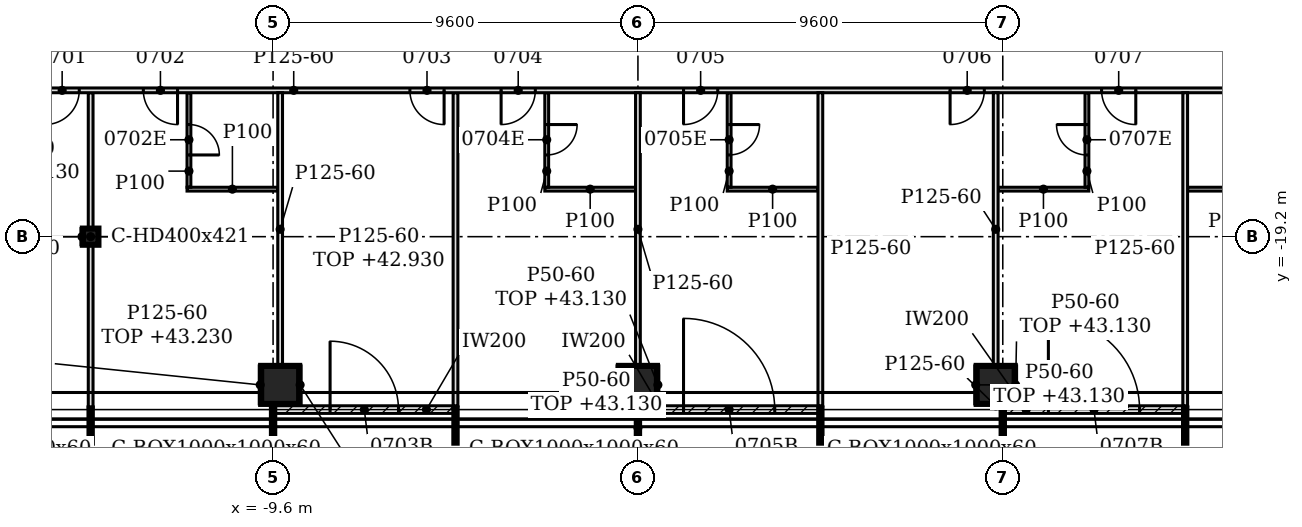
"""IFC4 building model, lengths in metres.
Left out: names, types, materials, properties, quantities, classifications, styles, units other than length and angle.
Written with IfcOpenShell. Run it as: python <this file> out.ifc"""

import sys

from ifc_helpers import new_model, si_unit, direction, frame, frame_2d, origin, origin_2d, place, context, subcontext, project, spatial, polyline, rectangle, hollow_rectangle, i_section, outline, extrude, element, fill, save


model = new_model("IFC4")
c1 = context("Model", 3, precision=1e-05, world=origin(), true_north=direction((0.0, 1.0)))
c2 = subcontext(c1, "Body", "Model", "MODEL_VIEW")
j1 = project(units=[si_unit("LENGTHUNIT", "METRE"), si_unit("PLANEANGLEUNIT", "RADIAN")], contexts=[c1])
p1 = place(None, origin())
s1 = spatial("IfcSite", under=j1, at=p1, CompositionType="ELEMENT")
p2 = place(p1, origin())
s2 = spatial("IfcBuilding", under=s1, at=p2, CompositionType="ELEMENT")
p3 = place(p2, frame((0.0, 0.0, 40.2)))
s3 = spatial("IfcBuildingStorey", under=s2, at=p3, CompositionType="ELEMENT", Elevation=40.2)
for number, where, z_axis, x_axis in (
    (1, (-9.414, -23.1, -0.15), (0.0, 0.0, 1.0), (1.0, 0.0, 0.0)),
    (2, (0.0, -23.1, -0.15), (0.0, 0.0, 1.0), (1.0, 0.0, 0.0)),
    (3, (9.414, -23.1, -0.15), (0.0, 0.0, 1.0), (1.0, 0.0, 0.0)),
):
    element("IfcColumn", number, at=place(p3, frame(where, z_axis=z_axis, x_axis=x_axis)), inside=s3, PredefinedType="COLUMN", context=c2, shape_type="SweptSolid", body=[
        extrude(hollow_rectangle(XDim=1.0, YDim=1.0, WallThickness=0.06, at=origin_2d()), origin(), (0.0, 0.0, 1.0), 3.6),
    ])
p4 = place(p3, frame((-14.4, -19.2, -0.15), z_axis=(0.0, 0.0, 1.0), x_axis=(1.0, 0.0, 0.0)))
e4 = element("IfcColumn", 4, at=p4, inside=s3, PredefinedType="COLUMN", context=c2, shape_type="SweptSolid", body=[
    extrude(i_section(OverallWidth=0.409, OverallDepth=0.425, WebThickness=0.033, FlangeThickness=0.052, FilletRadius=0.015, at=origin_2d()), origin(), (0.0, 0.0, 1.0), 3.6),
])
p5 = place(p3, frame((-9.57, -23.75, 0.0), z_axis=(0.0, 0.0, 1.0), x_axis=(1.0, 0.0, 0.0)))
e5 = element("IfcWall", 5, at=p5, inside=s3, PredefinedType="NOTDEFINED", context=c2, shape_type="SweptSolid", body=[
    extrude(rectangle(XDim=4.74, YDim=0.2, at=frame_2d((2.37, 0.0))), origin(), (0.0, 0.0, 1.0), 3.45),
])
p6 = place(p5, frame((1.47, 0.0, 0.0)))
e6 = element("IfcOpeningElement", 6, at=p6, cuts=e5, PredefinedType="OPENING", context=c2, shape_type="SweptSolid", body=[
    extrude(rectangle(XDim=1.8, YDim=2.4, at=frame_2d((0.9, 1.2))), frame((0.0, 0.11, 0.0), z_axis=(0.0, -1.0, 0.0), x_axis=(1.0, 0.0, 0.0)), (0.0, 0.0, 1.0), 0.22),
])
p7 = place(p3, frame((0.03, -23.75, 0.0), z_axis=(0.0, 0.0, 1.0), x_axis=(1.0, 0.0, 0.0)))
e7 = element("IfcWall", 7, at=p7, inside=s3, PredefinedType="NOTDEFINED", context=c2, shape_type="SweptSolid", body=[
    extrude(rectangle(XDim=4.74, YDim=0.2, at=frame_2d((2.37, 0.0))), origin(), (0.0, 0.0, 1.0), 3.45),
])
p8 = place(p7, frame((1.17, 0.0, 0.0)))
e8 = element("IfcOpeningElement", 8, at=p8, cuts=e7, PredefinedType="OPENING", context=c2, shape_type="SweptSolid", body=[
    extrude(rectangle(XDim=2.4, YDim=2.4, at=frame_2d((1.2, 1.2))), frame((0.0, 0.11, 0.0), z_axis=(0.0, -1.0, 0.0), x_axis=(1.0, 0.0, 0.0)), (0.0, 0.0, 1.0), 0.22),
])
p9 = place(p3, frame((9.63, -23.75, 0.0), z_axis=(0.0, 0.0, 1.0), x_axis=(1.0, 0.0, 0.0)))
e9 = element("IfcWall", 9, at=p9, inside=s3, PredefinedType="NOTDEFINED", context=c2, shape_type="SweptSolid", body=[
    extrude(rectangle(XDim=4.74, YDim=0.2, at=frame_2d((2.37, 0.0))), origin(), (0.0, 0.0, 1.0), 3.45),
])
p10 = place(p9, frame((1.17, 0.0, 0.0)))
e10 = element("IfcOpeningElement", 10, at=p10, cuts=e9, PredefinedType="OPENING", context=c2, shape_type="SweptSolid", body=[
    extrude(rectangle(XDim=2.4, YDim=2.4, at=frame_2d((1.2, 1.2))), frame((0.0, 0.11, 0.0), z_axis=(0.0, -1.0, 0.0), x_axis=(1.0, 0.0, 0.0)), (0.0, 0.0, 1.0), 0.22),
])
p11 = place(p3, frame((-14.4, -23.69, 0.0), z_axis=(0.0, 0.0, 1.0), x_axis=(0.0, 1.0, 0.0)))
e11 = element("IfcWall", 11, at=p11, inside=s3, PredefinedType="PARTITIONING", context=c2, shape_type="SweptSolid", body=[
    extrude(outline(polyline([(0.0, 0.0), (4.277, 0.0), (4.278, 3.03), (0.74, 3.03), (0.738, 2.93), (0.44, 2.93), (0.438, 3.03), (0.0, 3.03), (0.0, 0.0)])), frame((0.0, 0.062, 0.0), z_axis=(0.0, -1.0, 0.0), x_axis=(1.0, 0.0, 0.0)), (0.0, 0.0, 1.0), 0.125),
])
p12 = place(p3, frame((-4.8, -23.65, 0.0), z_axis=(0.0, 0.0, 1.0), x_axis=(0.0, 1.0, 0.0)))
e12 = element("IfcWall", 12, at=p12, inside=s3, PredefinedType="PARTITIONING", context=c2, shape_type="SweptSolid", body=[
    extrude(rectangle(XDim=8.237, YDim=0.125, at=frame_2d((4.119, 0.0))), origin(), (0.0, 0.0, 1.0), 2.73),
])
p13 = place(p3, frame((4.8, -23.65, 0.0), z_axis=(0.0, 0.0, 1.0), x_axis=(0.0, 1.0, 0.0)))
e13 = element("IfcWall", 13, at=p13, inside=s3, PredefinedType="PARTITIONING", context=c2, shape_type="SweptSolid", body=[
    extrude(outline(polyline([(0.0, 0.0), (8.237, 0.0), (8.238, 3.45), (4.555, 3.45), (4.553, 2.88), (4.345, 2.88), (4.343, 3.45), (0.7, 3.45), (0.698, 2.93), (0.4, 2.93), (0.398, 3.45), (0.0, 3.45), (0.0, 0.0)])), frame((0.0, 0.062, 0.0), z_axis=(0.0, -1.0, 0.0), x_axis=(1.0, 0.0, 0.0)), (0.0, 0.0, 1.0), 0.125),
])
p14 = place(p3, frame((9.414, -23.703, 0.0), z_axis=(0.0, 0.0, 1.0), x_axis=(0.0, 1.0, 0.0)))
e14 = element("IfcWall", 14, at=p14, inside=s3, PredefinedType="PARTITIONING", context=c2, shape_type="SweptSolid", body=[
    extrude(rectangle(XDim=0.103, YDim=0.125, at=frame_2d((0.051, 0.0))), origin(), (0.0, 0.0, 1.0), 3.45),
])
p15 = place(p3, frame((14.4, -23.65, 0.0), z_axis=(0.0, 0.0, 1.0), x_axis=(0.0, 1.0, 0.0)))
e15 = element("IfcWall", 15, at=p15, inside=s3, PredefinedType="PARTITIONING", context=c2, shape_type="SweptSolid", body=[
    extrude(outline(polyline([(0.0, 0.0), (8.237, 0.0), (8.238, 3.45), (4.555, 3.45), (4.553, 2.88), (4.345, 2.88), (4.343, 3.45), (0.7, 3.45), (0.698, 2.93), (0.4, 2.93), (0.398, 3.45), (0.0, 3.45), (0.0, 0.0)])), frame((0.0, 0.062, 0.0), z_axis=(0.0, -1.0, 0.0), x_axis=(1.0, 0.0, 0.0)), (0.0, 0.0, 1.0), 0.125),
])
p16 = place(p3, frame((-9.414, -22.6, 0.0), z_axis=(0.0, 0.0, 1.0), x_axis=(0.0, 1.0, 0.0)))
e16 = element("IfcWall", 16, at=p16, inside=s3, PredefinedType="PARTITIONING", context=c2, shape_type="SweptSolid", body=[
    extrude(outline(polyline([(0.0, 0.0), (7.188, 0.0), (7.188, 3.45), (3.5, 3.45), (3.498, 2.93), (3.3, 2.93), (3.298, 3.45), (0.0, 3.45), (0.0, 0.0)])), frame((0.0, 0.062, 0.0), z_axis=(0.0, -1.0, 0.0), x_axis=(1.0, 0.0, 0.0)), (0.0, 0.0, 1.0), 0.125),
])
for number, where, z_axis, x_axis in (
    (17, (0.0, -22.6, 0.0), (0.0, 0.0, 1.0), (0.0, 1.0, 0.0)),
    (18, (9.414, -22.6, 0.0), (0.0, 0.0, 1.0), (0.0, 1.0, 0.0)),
):
    element("IfcWall", number, at=place(p3, frame(where, z_axis=z_axis, x_axis=x_axis)), inside=s3, PredefinedType="PARTITIONING", context=c2, shape_type="SweptSolid", body=[
        extrude(outline(polyline([(0.0, 0.0), (7.188, 0.0), (7.188, 3.45), (3.505, 3.45), (3.503, 2.88), (3.295, 2.88), (3.293, 3.45), (0.0, 3.45), (0.0, 0.0)])), frame((0.0, 0.062, 0.0), z_axis=(0.0, -1.0, 0.0), x_axis=(1.0, 0.0, 0.0)), (0.0, 0.0, 1.0), 0.125),
    ])
p17 = place(p3, frame((-14.4, -18.988, 0.0), z_axis=(0.0, 0.0, 1.0), x_axis=(0.0, 1.0, 0.0)))
e19 = element("IfcWall", 19, at=p17, inside=s3, PredefinedType="PARTITIONING", context=c2, shape_type="SweptSolid", body=[
    extrude(rectangle(XDim=3.575, YDim=0.125, at=frame_2d((1.788, 0.0))), origin(), (0.0, 0.0, 1.0), 2.93),
])
p18 = place(p3, frame((-11.864, -17.95, 0.0), z_axis=(0.0, 0.0, 1.0), x_axis=(1.0, 0.0, 0.0)))
e20 = element("IfcWall", 20, at=p18, inside=s3, PredefinedType="PARTITIONING", context=c2, shape_type="SweptSolid", body=[
    extrude(rectangle(XDim=2.387, YDim=0.1, at=frame_2d((1.194, 0.0))), origin(), (0.0, 0.0, 1.0), 3.45),
])
p19 = place(p3, frame((-11.814, -17.9, 0.0), z_axis=(0.0, 0.0, 1.0), x_axis=(0.0, 1.0, 0.0)))
e21 = element("IfcWall", 21, at=p19, inside=s3, PredefinedType="PARTITIONING", context=c2, shape_type="SweptSolid", body=[
    extrude(rectangle(XDim=2.487, YDim=0.1, at=frame_2d((1.244, 0.0))), origin(), (0.0, 0.0, 1.0), 3.45),
])
p20 = place(p19, frame((0.85, 0.0, 0.0)))
e22 = element("IfcOpeningElement", 22, at=p20, cuts=e21, PredefinedType="OPENING", context=c2, shape_type="SweptSolid", body=[
    extrude(rectangle(XDim=0.8, YDim=2.1, at=frame_2d((0.4, 1.05))), frame((0.0, 0.06, 0.0), z_axis=(0.0, -1.0, 0.0), x_axis=(1.0, 0.0, 0.0)), (0.0, 0.0, 1.0), 0.12),
])
p21 = place(p3, frame((-2.45, -17.95, 0.0), z_axis=(0.0, 0.0, 1.0), x_axis=(1.0, 0.0, 0.0)))
e23 = element("IfcWall", 23, at=p21, inside=s3, PredefinedType="PARTITIONING", context=c2, shape_type="SweptSolid", body=[
    extrude(rectangle(XDim=2.387, YDim=0.1, at=frame_2d((1.194, 0.0))), origin(), (0.0, 0.0, 1.0), 3.45),
])
p22 = place(p3, frame((-2.4, -17.9, 0.0), z_axis=(0.0, 0.0, 1.0), x_axis=(0.0, 1.0, 0.0)))
e24 = element("IfcWall", 24, at=p22, inside=s3, PredefinedType="PARTITIONING", context=c2, shape_type="SweptSolid", body=[
    extrude(rectangle(XDim=2.487, YDim=0.1, at=frame_2d((1.244, 0.0))), origin(), (0.0, 0.0, 1.0), 3.45),
])
p23 = place(p22, frame((0.85, 0.0, 0.0)))
e25 = element("IfcOpeningElement", 25, at=p23, cuts=e24, PredefinedType="OPENING", context=c2, shape_type="SweptSolid", body=[
    extrude(rectangle(XDim=0.8, YDim=2.1, at=frame_2d((0.4, 1.05))), frame((0.0, 0.06, 0.0), z_axis=(0.0, -1.0, 0.0), x_axis=(1.0, 0.0, 0.0)), (0.0, 0.0, 1.0), 0.12),
])
p24 = place(p3, frame((2.35, -17.95, 0.0), z_axis=(0.0, 0.0, 1.0), x_axis=(1.0, 0.0, 0.0)))
e26 = element("IfcWall", 26, at=p24, inside=s3, PredefinedType="PARTITIONING", context=c2, shape_type="SweptSolid", body=[
    extrude(rectangle(XDim=2.387, YDim=0.1, at=frame_2d((1.194, 0.0))), origin(), (0.0, 0.0, 1.0), 3.45),
])
p25 = place(p3, frame((2.4, -17.9, 0.0), z_axis=(0.0, 0.0, 1.0), x_axis=(0.0, 1.0, 0.0)))
e27 = element("IfcWall", 27, at=p25, inside=s3, PredefinedType="PARTITIONING", context=c2, shape_type="SweptSolid", body=[
    extrude(rectangle(XDim=2.487, YDim=0.1, at=frame_2d((1.244, 0.0))), origin(), (0.0, 0.0, 1.0), 3.45),
])
p26 = place(p25, frame((0.85, 0.0, 0.0)))
e28 = element("IfcOpeningElement", 28, at=p26, cuts=e27, PredefinedType="OPENING", context=c2, shape_type="SweptSolid", body=[
    extrude(rectangle(XDim=0.8, YDim=2.1, at=frame_2d((0.4, 1.05))), frame((0.0, 0.06, 0.0), z_axis=(0.0, -1.0, 0.0), x_axis=(1.0, 0.0, 0.0)), (0.0, 0.0, 1.0), 0.12),
])
p27 = place(p3, frame((9.477, -17.95, 0.0), z_axis=(0.0, 0.0, 1.0), x_axis=(1.0, 0.0, 0.0)))
e29 = element("IfcWall", 29, at=p27, inside=s3, PredefinedType="PARTITIONING", context=c2, shape_type="SweptSolid", body=[
    extrude(rectangle(XDim=2.387, YDim=0.1, at=frame_2d((1.194, 0.0))), origin(), (0.0, 0.0, 1.0), 3.45),
])
p28 = place(p3, frame((11.814, -17.9, 0.0), z_axis=(0.0, 0.0, 1.0), x_axis=(0.0, 1.0, 0.0)))
e30 = element("IfcWall", 30, at=p28, inside=s3, PredefinedType="PARTITIONING", context=c2, shape_type="SweptSolid", body=[
    extrude(rectangle(XDim=2.487, YDim=0.1, at=frame_2d((1.244, 0.0))), origin(), (0.0, 0.0, 1.0), 3.45),
])
p29 = place(p28, frame((0.85, 0.0, 0.0)))
e31 = element("IfcOpeningElement", 31, at=p29, cuts=e30, PredefinedType="OPENING", context=c2, shape_type="SweptSolid", body=[
    extrude(rectangle(XDim=0.8, YDim=2.1, at=frame_2d((0.4, 1.05))), frame((0.0, 0.06, 0.0), z_axis=(0.0, -1.0, 0.0), x_axis=(1.0, 0.0, 0.0)), (0.0, 0.0, 1.0), 0.12),
])
p30 = place(p3, frame((14.462, -17.95, 0.0), z_axis=(0.0, 0.0, 1.0), x_axis=(1.0, 0.0, 0.0)))
e32 = element("IfcWall", 32, at=p30, inside=s3, PredefinedType="PARTITIONING", context=c2, shape_type="SweptSolid", body=[
    extrude(rectangle(XDim=2.388, YDim=0.1, at=frame_2d((1.194, 0.0))), origin(), (0.0, 0.0, 1.0), 3.45),
])
p31 = place(p3, frame((-20.15, -15.35, 0.0), z_axis=(0.0, 0.0, 1.0), x_axis=(1.0, 0.0, 0.0)))
e33 = element("IfcWall", 33, at=p31, inside=s3, PredefinedType="PARTITIONING", context=c2, shape_type="SweptSolid", body=[
    extrude(outline(polyline([(0.0, 0.0), (39.287, 0.0), (39.288, 2.73), (39.2, 2.73), (39.198, 3.45), (27.5, 3.45), (27.498, 2.73), (27.2, 2.73), (27.198, 3.45), (15.5, 3.45), (15.498, 2.73), (15.2, 2.73), (15.198, 3.45), (5.9, 3.45), (5.898, 2.93), (5.6, 2.93), (5.598, 3.45), (0.0, 3.45), (0.0, 0.0)])), frame((0.0, 0.062, 0.0), z_axis=(0.0, -1.0, 0.0), x_axis=(1.0, 0.0, 0.0)), (0.0, 0.0, 1.0), 0.125),
])
p32 = place(p31, frame((4.55, 0.0, 0.0)))
e34 = element("IfcOpeningElement", 34, at=p32, cuts=e33, PredefinedType="OPENING", context=c2, shape_type="SweptSolid", body=[
    extrude(rectangle(XDim=0.9, YDim=2.1, at=frame_2d((0.45, 1.05))), frame((0.0, 0.073, 0.0), z_axis=(0.0, -1.0, 0.0), x_axis=(1.0, 0.0, 0.0)), (0.0, 0.0, 1.0), 0.145),
])
p33 = place(p31, frame((7.136, 0.0, 0.0)))
e35 = element("IfcOpeningElement", 35, at=p33, cuts=e33, PredefinedType="OPENING", context=c2, shape_type="SweptSolid", body=[
    extrude(rectangle(XDim=0.9, YDim=2.1, at=frame_2d((0.45, 1.05))), frame((0.0, 0.073, 0.0), z_axis=(0.0, -1.0, 0.0), x_axis=(1.0, 0.0, 0.0)), (0.0, 0.0, 1.0), 0.145),
])
p34 = place(p31, frame((14.15, 0.0, 0.0)))
e36 = element("IfcOpeningElement", 36, at=p34, cuts=e33, PredefinedType="OPENING", context=c2, shape_type="SweptSolid", body=[
    extrude(rectangle(XDim=0.9, YDim=2.1, at=frame_2d((0.45, 1.05))), frame((0.0, 0.073, 0.0), z_axis=(0.0, -1.0, 0.0), x_axis=(1.0, 0.0, 0.0)), (0.0, 0.0, 1.0), 0.145),
])
p35 = place(p31, frame((16.55, 0.0, 0.0)))
e37 = element("IfcOpeningElement", 37, at=p35, cuts=e33, PredefinedType="OPENING", context=c2, shape_type="SweptSolid", body=[
    extrude(rectangle(XDim=0.9, YDim=2.1, at=frame_2d((0.45, 1.05))), frame((0.0, 0.073, 0.0), z_axis=(0.0, -1.0, 0.0), x_axis=(1.0, 0.0, 0.0)), (0.0, 0.0, 1.0), 0.145),
])
p36 = place(p31, frame((21.35, 0.0, 0.0)))
e38 = element("IfcOpeningElement", 38, at=p36, cuts=e33, PredefinedType="OPENING", context=c2, shape_type="SweptSolid", body=[
    extrude(rectangle(XDim=0.9, YDim=2.1, at=frame_2d((0.45, 1.05))), frame((0.0, 0.073, 0.0), z_axis=(0.0, -1.0, 0.0), x_axis=(1.0, 0.0, 0.0)), (0.0, 0.0, 1.0), 0.145),
])
p37 = place(p31, frame((28.364, 0.0, 0.0)))
e39 = element("IfcOpeningElement", 39, at=p37, cuts=e33, PredefinedType="OPENING", context=c2, shape_type="SweptSolid", body=[
    extrude(rectangle(XDim=0.9, YDim=2.1, at=frame_2d((0.45, 1.05))), frame((0.0, 0.073, 0.0), z_axis=(0.0, -1.0, 0.0), x_axis=(1.0, 0.0, 0.0)), (0.0, 0.0, 1.0), 0.145),
])
p38 = place(p31, frame((32.35, 0.0, 0.0)))
e40 = element("IfcOpeningElement", 40, at=p38, cuts=e33, PredefinedType="OPENING", context=c2, shape_type="SweptSolid", body=[
    extrude(rectangle(XDim=0.9, YDim=2.1, at=frame_2d((0.45, 1.05))), frame((0.0, 0.073, 0.0), z_axis=(0.0, -1.0, 0.0), x_axis=(1.0, 0.0, 0.0)), (0.0, 0.0, 1.0), 0.145),
])
p39 = place(p31, frame((37.35, 0.0, 0.0)))
e41 = element("IfcOpeningElement", 41, at=p39, cuts=e33, PredefinedType="OPENING", context=c2, shape_type="SweptSolid", body=[
    extrude(rectangle(XDim=0.9, YDim=2.1, at=frame_2d((0.45, 1.05))), frame((0.0, 0.073, 0.0), z_axis=(0.0, -1.0, 0.0), x_axis=(1.0, 0.0, 0.0)), (0.0, 0.0, 1.0), 0.145),
])
p40 = place(p3, frame((-14.629, -19.413, 0.0), z_axis=(0.0, 0.0, 1.0), x_axis=(0.0, 1.0, 0.0)))
e42 = element("IfcWall", 42, at=p40, inside=s3, PredefinedType="PARTITIONING", context=c2, shape_type="SweptSolid", body=[
    extrude(rectangle(XDim=0.425, YDim=0.05, at=frame_2d((0.212, 0.0))), origin(), (0.0, 0.0, 1.0), 2.98),
])
for number, where, z_axis, x_axis in (
    (43, (-0.525, -23.6, 0.0), (0.0, 0.0, 1.0), (0.0, 1.0, 0.0)),
    (44, (0.525, -23.6, 0.0), (0.0, 0.0, 1.0), (0.0, 1.0, 0.0)),
    (45, (8.889, -23.6, 0.0), (0.0, 0.0, 1.0), (0.0, 1.0, 0.0)),
    (46, (9.939, -23.6, 0.0), (0.0, 0.0, 1.0), (0.0, 1.0, 0.0)),
    (47, (-9.939, -23.6, 0.0), (0.0, 0.0, 1.0), (0.0, 1.0, 0.0)),
    (48, (-8.889, -23.6, 0.0), (0.0, 0.0, 1.0), (0.0, 1.0, 0.0)),
):
    element("IfcWall", number, at=place(p3, frame(where, z_axis=z_axis, x_axis=x_axis)), inside=s3, PredefinedType="PARTITIONING", context=c2, shape_type="SweptSolid", body=[
        extrude(rectangle(XDim=1.0, YDim=0.05, at=frame_2d((0.5, 0.0))), origin(), (0.0, 0.0, 1.0), 2.93),
    ])
p41 = place(p6, origin())
e49 = element("IfcDoor", 49, at=p41, inside=s3, OperationType="SINGLE_SWING_LEFT", PredefinedType="DOOR", context=c2, shape_type="SweptSolid", body=[
    extrude(rectangle(XDim=1.8, YDim=2.4, at=frame_2d((0.9, 1.2))), frame((0.0, 0.025, 0.0), z_axis=(0.0, -1.0, 0.0), x_axis=(1.0, 0.0, 0.0)), (0.0, 0.0, 1.0), 0.05),
])
fill(e6, e49)
p42 = place(p8, origin())
e50 = element("IfcDoor", 50, at=p42, inside=s3, OperationType="SINGLE_SWING_LEFT", PredefinedType="DOOR", context=c2, shape_type="SweptSolid", body=[
    extrude(rectangle(XDim=2.4, YDim=2.4, at=frame_2d((1.2, 1.2))), frame((0.0, 0.025, 0.0), z_axis=(0.0, -1.0, 0.0), x_axis=(1.0, 0.0, 0.0)), (0.0, 0.0, 1.0), 0.05),
])
fill(e8, e50)
p43 = place(p10, origin())
e51 = element("IfcDoor", 51, at=p43, inside=s3, OperationType="SINGLE_SWING_LEFT", PredefinedType="DOOR", context=c2, shape_type="SweptSolid", body=[
    extrude(rectangle(XDim=2.4, YDim=2.4, at=frame_2d((1.2, 1.2))), frame((0.0, 0.025, 0.0), z_axis=(0.0, -1.0, 0.0), x_axis=(1.0, 0.0, 0.0)), (0.0, 0.0, 1.0), 0.05),
])
fill(e10, e51)
p44 = place(p32, frame((0.9, 0.0, 0.0), z_axis=(0.0, 0.0, 1.0), x_axis=(-1.0, 0.0, 0.0)))
e52 = element("IfcDoor", 52, at=p44, inside=s3, OperationType="SINGLE_SWING_RIGHT", PredefinedType="DOOR", context=c2, shape_type="SweptSolid", body=[
    extrude(rectangle(XDim=0.9, YDim=2.1, at=frame_2d((0.45, 1.05))), frame((0.0, 0.025, 0.0), z_axis=(0.0, -1.0, 0.0), x_axis=(1.0, 0.0, 0.0)), (0.0, 0.0, 1.0), 0.05),
])
fill(e34, e52)
p45 = place(p33, frame((0.9, 0.0, 0.0), z_axis=(0.0, 0.0, 1.0), x_axis=(-1.0, 0.0, 0.0)))
e53 = element("IfcDoor", 53, at=p45, inside=s3, OperationType="SINGLE_SWING_LEFT", PredefinedType="DOOR", context=c2, shape_type="SweptSolid", body=[
    extrude(rectangle(XDim=0.9, YDim=2.1, at=frame_2d((0.45, 1.05))), frame((0.0, 0.025, 0.0), z_axis=(0.0, -1.0, 0.0), x_axis=(1.0, 0.0, 0.0)), (0.0, 0.0, 1.0), 0.05),
])
fill(e35, e53)
p46 = place(p20, frame((0.8, 0.0, 0.0), z_axis=(0.0, 0.0, 1.0), x_axis=(-1.0, 0.0, 0.0)))
e54 = element("IfcDoor", 54, at=p46, inside=s3, OperationType="SINGLE_SWING_RIGHT", PredefinedType="DOOR", context=c2, shape_type="SweptSolid", body=[
    extrude(rectangle(XDim=0.8, YDim=2.1, at=frame_2d((0.4, 1.05))), frame((0.0, 0.025, 0.0), z_axis=(0.0, -1.0, 0.0), x_axis=(1.0, 0.0, 0.0)), (0.0, 0.0, 1.0), 0.05),
])
fill(e22, e54)
p47 = place(p34, frame((0.9, 0.0, 0.0), z_axis=(0.0, 0.0, 1.0), x_axis=(-1.0, 0.0, 0.0)))
e55 = element("IfcDoor", 55, at=p47, inside=s3, OperationType="SINGLE_SWING_LEFT", PredefinedType="DOOR", context=c2, shape_type="SweptSolid", body=[
    extrude(rectangle(XDim=0.9, YDim=2.1, at=frame_2d((0.45, 1.05))), frame((0.0, 0.025, 0.0), z_axis=(0.0, -1.0, 0.0), x_axis=(1.0, 0.0, 0.0)), (0.0, 0.0, 1.0), 0.05),
])
fill(e36, e55)
p48 = place(p35, frame((0.9, 0.0, 0.0), z_axis=(0.0, 0.0, 1.0), x_axis=(-1.0, 0.0, 0.0)))
e56 = element("IfcDoor", 56, at=p48, inside=s3, OperationType="SINGLE_SWING_RIGHT", PredefinedType="DOOR", context=c2, shape_type="SweptSolid", body=[
    extrude(rectangle(XDim=0.9, YDim=2.1, at=frame_2d((0.45, 1.05))), frame((0.0, 0.025, 0.0), z_axis=(0.0, -1.0, 0.0), x_axis=(1.0, 0.0, 0.0)), (0.0, 0.0, 1.0), 0.05),
])
fill(e37, e56)
p49 = place(p23, frame((0.8, 0.0, 0.0), z_axis=(0.0, 0.0, 1.0), x_axis=(-1.0, 0.0, 0.0)))
e57 = element("IfcDoor", 57, at=p49, inside=s3, OperationType="SINGLE_SWING_LEFT", PredefinedType="DOOR", context=c2, shape_type="SweptSolid", body=[
    extrude(rectangle(XDim=0.8, YDim=2.1, at=frame_2d((0.4, 1.05))), frame((0.0, 0.025, 0.0), z_axis=(0.0, -1.0, 0.0), x_axis=(1.0, 0.0, 0.0)), (0.0, 0.0, 1.0), 0.05),
])
fill(e25, e57)
p50 = place(p36, frame((0.9, 0.0, 0.0), z_axis=(0.0, 0.0, 1.0), x_axis=(-1.0, 0.0, 0.0)))
e58 = element("IfcDoor", 58, at=p50, inside=s3, OperationType="SINGLE_SWING_RIGHT", PredefinedType="DOOR", context=c2, shape_type="SweptSolid", body=[
    extrude(rectangle(XDim=0.9, YDim=2.1, at=frame_2d((0.45, 1.05))), frame((0.0, 0.025, 0.0), z_axis=(0.0, -1.0, 0.0), x_axis=(1.0, 0.0, 0.0)), (0.0, 0.0, 1.0), 0.05),
])
fill(e38, e58)
p51 = place(p26, frame((0.8, 0.0, 0.0), z_axis=(0.0, 0.0, 1.0), x_axis=(-1.0, 0.0, 0.0)))
e59 = element("IfcDoor", 59, at=p51, inside=s3, OperationType="SINGLE_SWING_LEFT", PredefinedType="DOOR", context=c2, shape_type="SweptSolid", body=[
    extrude(rectangle(XDim=0.8, YDim=2.1, at=frame_2d((0.4, 1.05))), frame((0.0, 0.025, 0.0), z_axis=(0.0, -1.0, 0.0), x_axis=(1.0, 0.0, 0.0)), (0.0, 0.0, 1.0), 0.05),
])
fill(e28, e59)
p52 = place(p37, frame((0.9, 0.0, 0.0), z_axis=(0.0, 0.0, 1.0), x_axis=(-1.0, 0.0, 0.0)))
e60 = element("IfcDoor", 60, at=p52, inside=s3, OperationType="SINGLE_SWING_RIGHT", PredefinedType="DOOR", context=c2, shape_type="SweptSolid", body=[
    extrude(rectangle(XDim=0.9, YDim=2.1, at=frame_2d((0.45, 1.05))), frame((0.0, 0.025, 0.0), z_axis=(0.0, -1.0, 0.0), x_axis=(1.0, 0.0, 0.0)), (0.0, 0.0, 1.0), 0.05),
])
fill(e39, e60)
p53 = place(p38, frame((0.9, 0.0, 0.0), z_axis=(0.0, 0.0, 1.0), x_axis=(-1.0, 0.0, 0.0)))
e61 = element("IfcDoor", 61, at=p53, inside=s3, OperationType="SINGLE_SWING_LEFT", PredefinedType="DOOR", context=c2, shape_type="SweptSolid", body=[
    extrude(rectangle(XDim=0.9, YDim=2.1, at=frame_2d((0.45, 1.05))), frame((0.0, 0.025, 0.0), z_axis=(0.0, -1.0, 0.0), x_axis=(1.0, 0.0, 0.0)), (0.0, 0.0, 1.0), 0.05),
])
fill(e40, e61)
p54 = place(p29, origin())
e62 = element("IfcDoor", 62, at=p54, inside=s3, OperationType="SINGLE_SWING_RIGHT", PredefinedType="DOOR", context=c2, shape_type="SweptSolid", body=[
    extrude(rectangle(XDim=0.8, YDim=2.1, at=frame_2d((0.4, 1.05))), frame((0.0, 0.025, 0.0), z_axis=(0.0, -1.0, 0.0), x_axis=(1.0, 0.0, 0.0)), (0.0, 0.0, 1.0), 0.05),
])
fill(e31, e62)
save(model, sys.argv[1])
